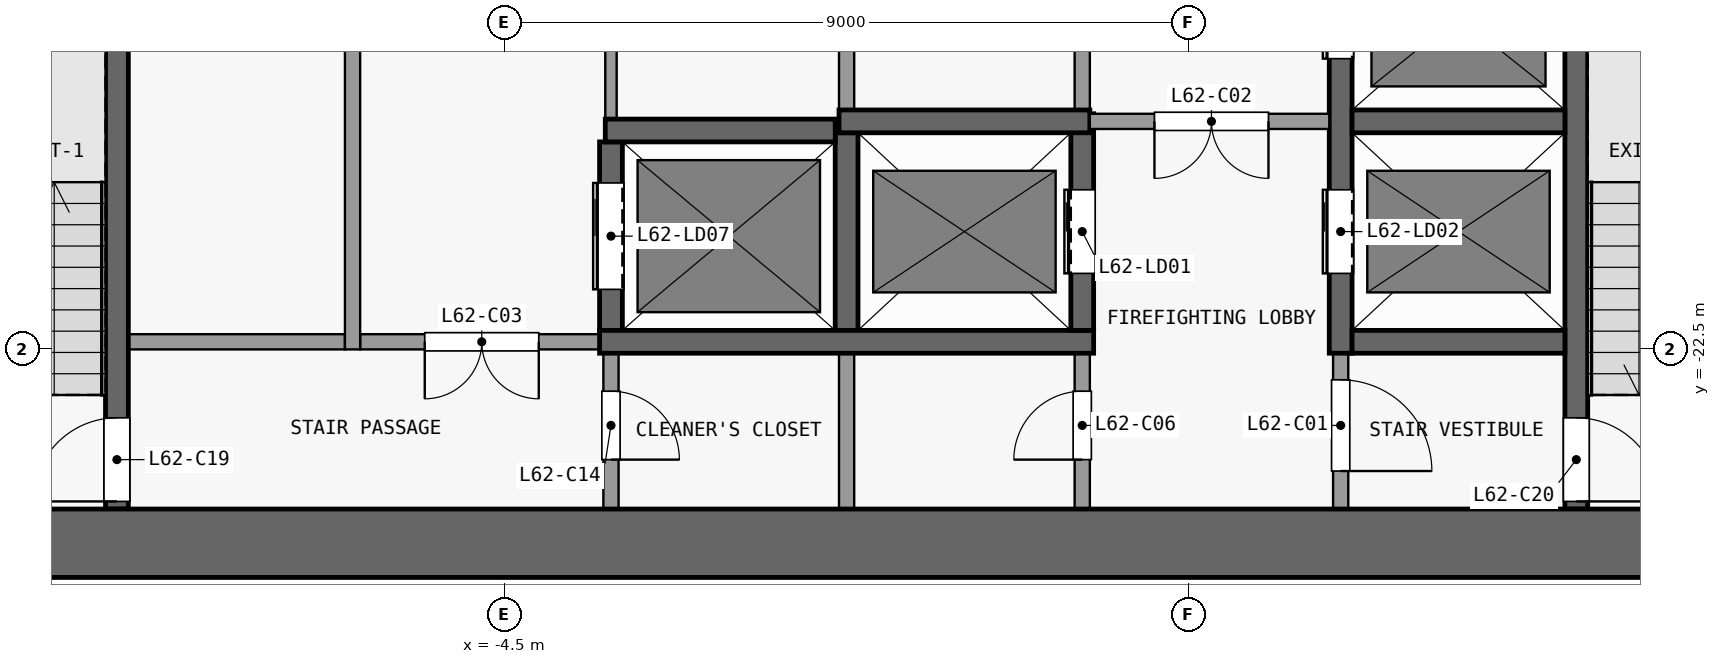
"""IFC4 building model, lengths in metres.
Left out: names, types, materials, properties, quantities, classifications, styles, units other than length and angle.
Written with IfcOpenShell. Run it as: python <this file> out.ifc"""

import sys

from ifc_helpers import new_model, si_unit, direction, frame, frame_2d, origin, place, context, subcontext, project, spatial, rectangle, extrude, element, fill, save


model = new_model("IFC4")
c1 = context("Model", 3, precision=1e-05, world=origin(), true_north=direction((0.0, 1.0)))
c2 = subcontext(c1, "Body", "Model", "MODEL_VIEW")
j1 = project(units=[si_unit("LENGTHUNIT", "METRE"), si_unit("PLANEANGLEUNIT", "RADIAN")], contexts=[c1])
p1 = place(None, origin())
s1 = spatial("IfcSite", under=j1, at=p1, CompositionType="ELEMENT")
p2 = place(p1, origin())
s2 = spatial("IfcBuilding", under=s1, at=p2, CompositionType="ELEMENT")
p3 = place(p2, frame((0.0, 0.0, 244.7)))
s3 = spatial("IfcBuildingStorey", under=s2, at=p3, CompositionType="ELEMENT", Elevation=244.7)
p4 = place(p3, frame((-13.2, -25.05, 0.0), z_axis=(0.0, 0.0, 1.0), x_axis=(1.0, 0.0, 0.0)))
e1 = element("IfcWall", 1, at=p4, inside=s3, PredefinedType="SHEAR", context=c2, shape_type="SweptSolid", body=[
    extrude(rectangle(XDim=26.4, YDim=0.9, at=frame_2d((13.2, 0.0))), origin(), (0.0, 0.0, 1.0), 3.15),
])
p5 = place(p3, frame((-9.45, -22.4, 0.0), z_axis=(0.0, 0.0, 1.0), x_axis=(1.0, 0.0, 0.0)))
e2 = element("IfcWall", 2, at=p5, inside=s3, PredefinedType="PARTITIONING", context=c2, shape_type="SweptSolid", body=[
    extrude(rectangle(XDim=2.85, YDim=0.2, at=frame_2d((1.425, 0.0))), origin(), (0.0, 0.0, 1.0), 3.15),
])
p6 = place(p3, frame((-3.25, -22.4, 0.0), z_axis=(0.0, 0.0, 1.0), x_axis=(-1.0, 0.0, 0.0)))
e3 = element("IfcWall", 3, at=p6, inside=s3, PredefinedType="PARTITIONING", context=c2, shape_type="SweptSolid", body=[
    extrude(rectangle(XDim=3.15, YDim=0.2, at=frame_2d((1.575, 0.0))), origin(), (0.0, 0.0, 1.0), 3.15),
])
p7 = place(p6, frame((0.8, 0.0, 0.0)))
e4 = element("IfcOpeningElement", 4, at=p7, cuts=e3, PredefinedType="OPENING", context=c2, shape_type="SweptSolid", body=[
    extrude(rectangle(XDim=1.5, YDim=2.1, at=frame_2d((0.75, 1.05))), frame((0.0, 0.11, 0.0), z_axis=(0.0, -1.0, 0.0), x_axis=(1.0, 0.0, 0.0)), (0.0, 0.0, 1.0), 0.22),
])
p8 = place(p3, frame((-3.25, -22.4, 0.0), z_axis=(0.0, 0.0, 1.0), x_axis=(1.0, 0.0, 0.0)))
e5 = element("IfcWall", 5, at=p8, inside=s3, PredefinedType="SHEAR", context=c2, shape_type="SweptSolid", body=[
    extrude(rectangle(XDim=6.5, YDim=0.3, at=frame_2d((3.25, 0.0))), origin(), (0.0, 0.0, 1.0), 3.15),
])
p9 = place(p3, frame((6.65, -22.4, 0.0), z_axis=(0.0, 0.0, 1.0), x_axis=(1.0, 0.0, 0.0)))
e6 = element("IfcWall", 6, at=p9, inside=s3, PredefinedType="SHEAR", context=c2, shape_type="SweptSolid", body=[
    extrude(rectangle(XDim=2.8, YDim=0.3, at=frame_2d((1.4, 0.0))), origin(), (0.0, 0.0, 1.0), 3.15),
])
p10 = place(p3, frame((-3.175, -19.62, 0.0), z_axis=(0.0, 0.0, 1.0), x_axis=(1.0, 0.0, 0.0)))
e7 = element("IfcWall", 7, at=p10, inside=s3, PredefinedType="SHEAR", context=c2, shape_type="SweptSolid", body=[
    extrude(rectangle(XDim=3.025, YDim=0.3, at=frame_2d((1.513, 0.0))), origin(), (0.0, 0.0, 1.0), 3.15),
])
p11 = place(p3, frame((-0.1, -19.5, 0.0), z_axis=(0.0, 0.0, 1.0), x_axis=(1.0, 0.0, 0.0)))
e8 = element("IfcWall", 8, at=p11, inside=s3, PredefinedType="SHEAR", context=c2, shape_type="SweptSolid", body=[
    extrude(rectangle(XDim=3.3, YDim=0.3, at=frame_2d((1.65, 0.0))), origin(), (0.0, 0.0, 1.0), 3.15),
])
p12 = place(p3, frame((6.35, -19.5, 0.0), z_axis=(0.0, 0.0, 1.0), x_axis=(-1.0, 0.0, 0.0)))
e9 = element("IfcWall", 9, at=p12, inside=s3, PredefinedType="PARTITIONING", context=c2, shape_type="SweptSolid", body=[
    extrude(rectangle(XDim=3.15, YDim=0.2, at=frame_2d((1.575, 0.0))), origin(), (0.0, 0.0, 1.0), 3.15),
])
p13 = place(p12, frame((0.8, 0.0, 0.0)))
e10 = element("IfcOpeningElement", 10, at=p13, cuts=e9, PredefinedType="OPENING", context=c2, shape_type="SweptSolid", body=[
    extrude(rectangle(XDim=1.5, YDim=2.1, at=frame_2d((0.75, 1.05))), frame((0.0, 0.11, 0.0), z_axis=(0.0, -1.0, 0.0), x_axis=(1.0, 0.0, 0.0)), (0.0, 0.0, 1.0), 0.22),
])
p14 = place(p3, frame((6.65, -19.5, 0.0), z_axis=(0.0, 0.0, 1.0), x_axis=(1.0, 0.0, 0.0)))
e11 = element("IfcWall", 11, at=p14, inside=s3, PredefinedType="SHEAR", context=c2, shape_type="SweptSolid", body=[
    extrude(rectangle(XDim=2.8, YDim=0.3, at=frame_2d((1.4, 0.0))), origin(), (0.0, 0.0, 1.0), 3.15),
])
p15 = place(p3, frame((-9.6, -24.6, 0.0), z_axis=(0.0, 0.0, 1.0), x_axis=(0.0, 1.0, 0.0)))
e12 = element("IfcWall", 12, at=p15, inside=s3, PredefinedType="SHEAR", context=c2, shape_type="SweptSolid", body=[
    extrude(rectangle(XDim=7.7, YDim=0.3, at=frame_2d((3.85, 0.0))), origin(), (0.0, 0.0, 1.0), 3.15),
])
p16 = place(p15, frame((0.1, 0.0, 0.0)))
e13 = element("IfcOpeningElement", 13, at=p16, cuts=e12, PredefinedType="OPENING", context=c2, shape_type="SweptSolid", body=[
    extrude(rectangle(XDim=1.1, YDim=2.1, at=frame_2d((0.55, 1.05))), frame((0.0, 0.16, 0.0), z_axis=(0.0, -1.0, 0.0), x_axis=(1.0, 0.0, 0.0)), (0.0, 0.0, 1.0), 0.32),
])
p17 = place(p3, frame((-6.5, -22.5, 0.0), z_axis=(0.0, 0.0, 1.0), x_axis=(0.0, 1.0, 0.0)))
e14 = element("IfcWall", 14, at=p17, inside=s3, PredefinedType="PARTITIONING", context=c2, shape_type="SweptSolid", body=[
    extrude(rectangle(XDim=14.0, YDim=0.2, at=frame_2d((7.0, 0.0))), origin(), (0.0, 0.0, 1.0), 3.15),
])
p18 = place(p17, frame((6.45, 0.0, 0.0)))
e15 = element("IfcOpeningElement", 15, at=p18, cuts=e14, PredefinedType="OPENING", context=c2, shape_type="SweptSolid", body=[
    extrude(rectangle(XDim=1.2, YDim=2.1, at=frame_2d((0.6, 1.05))), frame((0.0, 0.11, 0.0), z_axis=(0.0, -1.0, 0.0), x_axis=(1.0, 0.0, 0.0)), (0.0, 0.0, 1.0), 0.22),
])
p19 = place(p3, frame((-3.1, -22.55, 0.0), z_axis=(0.0, 0.0, 1.0), x_axis=(0.0, -1.0, 0.0)))
e16 = element("IfcWall", 16, at=p19, inside=s3, PredefinedType="PARTITIONING", context=c2, shape_type="SweptSolid", body=[
    extrude(rectangle(XDim=2.05, YDim=0.2, at=frame_2d((1.025, 0.0))), origin(), (0.0, 0.0, 1.0), 3.15),
])
p20 = place(p19, frame((0.5, 0.0, 0.0)))
e17 = element("IfcOpeningElement", 17, at=p20, cuts=e16, PredefinedType="OPENING", context=c2, shape_type="SweptSolid", body=[
    extrude(rectangle(XDim=0.9, YDim=2.1, at=frame_2d((0.45, 1.05))), frame((0.0, 0.11, 0.0), z_axis=(0.0, -1.0, 0.0), x_axis=(1.0, 0.0, 0.0)), (0.0, 0.0, 1.0), 0.22),
])
p21 = place(p3, frame((-3.1, -22.25, 0.0), z_axis=(0.0, 0.0, 1.0), x_axis=(0.0, 1.0, 0.0)))
e18 = element("IfcWall", 18, at=p21, inside=s3, PredefinedType="SHEAR", context=c2, shape_type="SweptSolid", body=[
    extrude(rectangle(XDim=2.48, YDim=0.3, at=frame_2d((1.24, 0.0))), origin(), (0.0, 0.0, 1.0), 3.15),
])
p22 = place(p21, frame((0.54, 0.0, 0.0)))
e19 = element("IfcOpeningElement", 19, at=p22, cuts=e18, PredefinedType="OPENING", context=c2, shape_type="SweptSolid", body=[
    extrude(rectangle(XDim=1.4, YDim=2.1, at=frame_2d((0.7, 1.05))), frame((0.0, 0.16, 0.0), z_axis=(0.0, -1.0, 0.0), x_axis=(1.0, 0.0, 0.0)), (0.0, 0.0, 1.0), 0.32),
])
p23 = place(p3, frame((-3.1, -8.5, 0.0), z_axis=(0.0, 0.0, 1.0), x_axis=(0.0, -1.0, 0.0)))
e20 = element("IfcWall", 20, at=p23, inside=s3, PredefinedType="PARTITIONING", context=c2, shape_type="SweptSolid", body=[
    extrude(rectangle(XDim=10.97, YDim=0.15, at=frame_2d((5.485, 0.0))), origin(), (0.0, 0.0, 1.0), 3.15),
])
p24 = place(p23, frame((7.74, 0.0, 0.0)))
e21 = element("IfcOpeningElement", 21, at=p24, cuts=e20, PredefinedType="OPENING", context=c2, shape_type="SweptSolid", body=[
    extrude(rectangle(XDim=1.2, YDim=2.1, at=frame_2d((0.6, 1.05))), frame((0.0, 0.085, 0.0), z_axis=(0.0, -1.0, 0.0), x_axis=(1.0, 0.0, 0.0)), (0.0, 0.0, 1.0), 0.17),
])
p25 = place(p23, frame((2.18, 0.0, 0.0)))
e22 = element("IfcOpeningElement", 22, at=p25, cuts=e20, PredefinedType="OPENING", context=c2, shape_type="SweptSolid", body=[
    extrude(rectangle(XDim=1.2, YDim=2.1, at=frame_2d((0.6, 1.05))), frame((0.0, 0.085, 0.0), z_axis=(0.0, -1.0, 0.0), x_axis=(1.0, 0.0, 0.0)), (0.0, 0.0, 1.0), 0.17),
])
p26 = place(p3, frame((0.0, -24.6, 0.0), z_axis=(0.0, 0.0, 1.0), x_axis=(0.0, 1.0, 0.0)))
e23 = element("IfcWall", 23, at=p26, inside=s3, PredefinedType="PARTITIONING", context=c2, shape_type="SweptSolid", body=[
    extrude(rectangle(XDim=2.05, YDim=0.2, at=frame_2d((1.025, 0.0))), origin(), (0.0, 0.0, 1.0), 3.15),
])
p27 = place(p3, frame((0.0, -22.25, 0.0), z_axis=(0.0, 0.0, 1.0), x_axis=(0.0, 1.0, 0.0)))
e24 = element("IfcWall", 24, at=p27, inside=s3, PredefinedType="SHEAR", context=c2, shape_type="SweptSolid", body=[
    extrude(rectangle(XDim=2.6, YDim=0.3, at=frame_2d((1.3, 0.0))), origin(), (0.0, 0.0, 1.0), 3.15),
])
p28 = place(p3, frame((0.0, -19.35, 0.0), z_axis=(0.0, 0.0, 1.0), x_axis=(0.0, 1.0, 0.0)))
e25 = element("IfcWall", 25, at=p28, inside=s3, PredefinedType="PARTITIONING", context=c2, shape_type="SweptSolid", body=[
    extrude(rectangle(XDim=10.85, YDim=0.2, at=frame_2d((5.425, 0.0))), origin(), (0.0, 0.0, 1.0), 3.15),
])
p29 = place(p3, frame((3.1, -24.6, 0.0), z_axis=(0.0, 0.0, 1.0), x_axis=(0.0, 1.0, 0.0)))
e26 = element("IfcWall", 26, at=p29, inside=s3, PredefinedType="PARTITIONING", context=c2, shape_type="SweptSolid", body=[
    extrude(rectangle(XDim=2.05, YDim=0.2, at=frame_2d((1.025, 0.0))), origin(), (0.0, 0.0, 1.0), 3.15),
])
p30 = place(p29, frame((0.65, 0.0, 0.0)))
e27 = element("IfcOpeningElement", 27, at=p30, cuts=e26, PredefinedType="OPENING", context=c2, shape_type="SweptSolid", body=[
    extrude(rectangle(XDim=0.9, YDim=2.1, at=frame_2d((0.45, 1.05))), frame((0.0, 0.11, 0.0), z_axis=(0.0, -1.0, 0.0), x_axis=(1.0, 0.0, 0.0)), (0.0, 0.0, 1.0), 0.22),
])
p31 = place(p3, frame((3.1, -22.25, 0.0), z_axis=(0.0, 0.0, 1.0), x_axis=(0.0, 1.0, 0.0)))
e28 = element("IfcWall", 28, at=p31, inside=s3, PredefinedType="SHEAR", context=c2, shape_type="SweptSolid", body=[
    extrude(rectangle(XDim=2.85, YDim=0.3, at=frame_2d((1.425, 0.0))), origin(), (0.0, 0.0, 1.0), 3.15),
])
p32 = place(p31, frame((0.75, 0.0, 0.0)))
e29 = element("IfcOpeningElement", 29, at=p32, cuts=e28, PredefinedType="OPENING", context=c2, shape_type="SweptSolid", body=[
    extrude(rectangle(XDim=1.1, YDim=2.1, at=frame_2d((0.55, 1.05))), frame((0.0, 0.16, 0.0), z_axis=(0.0, -1.0, 0.0), x_axis=(1.0, 0.0, 0.0)), (0.0, 0.0, 1.0), 0.32),
])
p33 = place(p3, frame((3.1, -19.6, 0.0), z_axis=(0.0, 0.0, 1.0), x_axis=(0.0, 1.0, 0.0)))
e30 = element("IfcWall", 30, at=p33, inside=s3, PredefinedType="PARTITIONING", context=c2, shape_type="SweptSolid", body=[
    extrude(rectangle(XDim=11.1, YDim=0.2, at=frame_2d((5.55, 0.0))), origin(), (0.0, 0.0, 1.0), 3.15),
])
p34 = place(p33, frame((2.25, 0.0, 0.0)))
e31 = element("IfcOpeningElement", 31, at=p34, cuts=e30, PredefinedType="OPENING", context=c2, shape_type="SweptSolid", body=[
    extrude(rectangle(XDim=1.2, YDim=2.1, at=frame_2d((0.6, 1.05))), frame((0.0, 0.11, 0.0), z_axis=(0.0, -1.0, 0.0), x_axis=(1.0, 0.0, 0.0)), (0.0, 0.0, 1.0), 0.22),
])
p35 = place(p33, frame((7.75, 0.0, 0.0)))
e32 = element("IfcOpeningElement", 32, at=p35, cuts=e30, PredefinedType="OPENING", context=c2, shape_type="SweptSolid", body=[
    extrude(rectangle(XDim=1.2, YDim=2.1, at=frame_2d((0.6, 1.05))), frame((0.0, 0.11, 0.0), z_axis=(0.0, -1.0, 0.0), x_axis=(1.0, 0.0, 0.0)), (0.0, 0.0, 1.0), 0.22),
])
p36 = place(p3, frame((6.5, -22.55, 0.0), z_axis=(0.0, 0.0, 1.0), x_axis=(0.0, -1.0, 0.0)))
e33 = element("IfcWall", 33, at=p36, inside=s3, PredefinedType="PARTITIONING", context=c2, shape_type="SweptSolid", body=[
    extrude(rectangle(XDim=2.05, YDim=0.2, at=frame_2d((1.025, 0.0))), origin(), (0.0, 0.0, 1.0), 3.15),
])
p37 = place(p36, frame((0.35, 0.0, 0.0)))
e34 = element("IfcOpeningElement", 34, at=p37, cuts=e33, PredefinedType="OPENING", context=c2, shape_type="SweptSolid", body=[
    extrude(rectangle(XDim=1.2, YDim=2.1, at=frame_2d((0.6, 1.05))), frame((0.0, 0.11, 0.0), z_axis=(0.0, -1.0, 0.0), x_axis=(1.0, 0.0, 0.0)), (0.0, 0.0, 1.0), 0.22),
])
p38 = place(p3, frame((6.5, -22.55, 0.0), z_axis=(0.0, 0.0, 1.0), x_axis=(0.0, 1.0, 0.0)))
e35 = element("IfcWall", 35, at=p38, inside=s3, PredefinedType="SHEAR", context=c2, shape_type="SweptSolid", body=[
    extrude(rectangle(XDim=14.05, YDim=0.3, at=frame_2d((7.025, 0.0))), origin(), (0.0, 0.0, 1.0), 3.15),
])
p39 = place(p38, frame((1.05, 0.0, 0.0)))
e36 = element("IfcOpeningElement", 36, at=p39, cuts=e35, PredefinedType="OPENING", context=c2, shape_type="SweptSolid", body=[
    extrude(rectangle(XDim=1.1, YDim=2.1, at=frame_2d((0.55, 1.05))), frame((0.0, 0.16, 0.0), z_axis=(0.0, -1.0, 0.0), x_axis=(1.0, 0.0, 0.0)), (0.0, 0.0, 1.0), 0.32),
])
p40 = place(p38, frame((3.875, 0.0, 0.0)))
e37 = element("IfcOpeningElement", 37, at=p40, cuts=e35, PredefinedType="OPENING", context=c2, shape_type="SweptSolid", body=[
    extrude(rectangle(XDim=1.1, YDim=2.1, at=frame_2d((0.55, 1.05))), frame((0.0, 0.16, 0.0), z_axis=(0.0, -1.0, 0.0), x_axis=(1.0, 0.0, 0.0)), (0.0, 0.0, 1.0), 0.32),
])
p41 = place(p38, frame((6.625, 0.0, 0.0)))
e38 = element("IfcOpeningElement", 38, at=p41, cuts=e35, PredefinedType="OPENING", context=c2, shape_type="SweptSolid", body=[
    extrude(rectangle(XDim=1.1, YDim=2.1, at=frame_2d((0.55, 1.05))), frame((0.0, 0.16, 0.0), z_axis=(0.0, -1.0, 0.0), x_axis=(1.0, 0.0, 0.0)), (0.0, 0.0, 1.0), 0.32),
])
p42 = place(p38, frame((9.375, 0.0, 0.0)))
e39 = element("IfcOpeningElement", 39, at=p42, cuts=e35, PredefinedType="OPENING", context=c2, shape_type="SweptSolid", body=[
    extrude(rectangle(XDim=1.1, YDim=2.1, at=frame_2d((0.55, 1.05))), frame((0.0, 0.16, 0.0), z_axis=(0.0, -1.0, 0.0), x_axis=(1.0, 0.0, 0.0)), (0.0, 0.0, 1.0), 0.32),
])
p43 = place(p38, frame((12.125, 0.0, 0.0)))
e40 = element("IfcOpeningElement", 40, at=p43, cuts=e35, PredefinedType="OPENING", context=c2, shape_type="SweptSolid", body=[
    extrude(rectangle(XDim=1.1, YDim=2.1, at=frame_2d((0.55, 1.05))), frame((0.0, 0.16, 0.0), z_axis=(0.0, -1.0, 0.0), x_axis=(1.0, 0.0, 0.0)), (0.0, 0.0, 1.0), 0.32),
])
p44 = place(p3, frame((9.6, -16.9, 0.0), z_axis=(0.0, 0.0, 1.0), x_axis=(0.0, -1.0, 0.0)))
e41 = element("IfcWall", 41, at=p44, inside=s3, PredefinedType="SHEAR", context=c2, shape_type="SweptSolid", body=[
    extrude(rectangle(XDim=7.7, YDim=0.3, at=frame_2d((3.85, 0.0))), origin(), (0.0, 0.0, 1.0), 3.15),
])
p45 = place(p44, frame((6.5, 0.0, 0.0)))
e42 = element("IfcOpeningElement", 42, at=p45, cuts=e41, PredefinedType="OPENING", context=c2, shape_type="SweptSolid", body=[
    extrude(rectangle(XDim=1.1, YDim=2.1, at=frame_2d((0.55, 1.05))), frame((0.0, 0.16, 0.0), z_axis=(0.0, -1.0, 0.0), x_axis=(1.0, 0.0, 0.0)), (0.0, 0.0, 1.0), 0.32),
])
p46 = place(p32, origin())
e43 = element("IfcDoor", 43, at=p46, inside=s3, OperationType="DOUBLE_DOOR_SLIDING", PredefinedType="DOOR", context=c2, shape_type="SweptSolid", body=[
    extrude(rectangle(XDim=1.1, YDim=2.1, at=frame_2d((0.55, 1.05))), frame((0.0, 0.025, 0.0), z_axis=(0.0, -1.0, 0.0), x_axis=(1.0, 0.0, 0.0)), (0.0, 0.0, 1.0), 0.05),
])
fill(e29, e43)
p47 = place(p39, origin())
e44 = element("IfcDoor", 44, at=p47, inside=s3, OperationType="DOUBLE_DOOR_SLIDING", PredefinedType="DOOR", context=c2, shape_type="SweptSolid", body=[
    extrude(rectangle(XDim=1.1, YDim=2.1, at=frame_2d((0.55, 1.05))), frame((0.0, 0.025, 0.0), z_axis=(0.0, -1.0, 0.0), x_axis=(1.0, 0.0, 0.0)), (0.0, 0.0, 1.0), 0.05),
])
fill(e36, e44)
p48 = place(p40, origin())
e45 = element("IfcDoor", 45, at=p48, inside=s3, OperationType="DOUBLE_DOOR_SLIDING", PredefinedType="DOOR", context=c2, shape_type="SweptSolid", body=[
    extrude(rectangle(XDim=1.1, YDim=2.1, at=frame_2d((0.55, 1.05))), frame((0.0, 0.025, 0.0), z_axis=(0.0, -1.0, 0.0), x_axis=(1.0, 0.0, 0.0)), (0.0, 0.0, 1.0), 0.05),
])
fill(e37, e45)
p49 = place(p22, origin())
e46 = element("IfcDoor", 46, at=p49, inside=s3, OperationType="DOUBLE_DOOR_SLIDING", PredefinedType="DOOR", context=c2, shape_type="SweptSolid", body=[
    extrude(rectangle(XDim=1.4, YDim=2.1, at=frame_2d((0.7, 1.05))), frame((0.0, 0.025, 0.0), z_axis=(0.0, -1.0, 0.0), x_axis=(1.0, 0.0, 0.0)), (0.0, 0.0, 1.0), 0.05),
])
fill(e19, e46)
p50 = place(p37, origin())
e47 = element("IfcDoor", 47, at=p50, inside=s3, OperationType="SINGLE_SWING_RIGHT", PredefinedType="DOOR", context=c2, shape_type="SweptSolid", body=[
    extrude(rectangle(XDim=1.2, YDim=2.1, at=frame_2d((0.6, 1.05))), frame((0.0, 0.025, 0.0), z_axis=(0.0, -1.0, 0.0), x_axis=(1.0, 0.0, 0.0)), (0.0, 0.0, 1.0), 0.05),
])
fill(e34, e47)
p51 = place(p13, origin())
e48 = element("IfcDoor", 48, at=p51, inside=s3, OperationType="DOUBLE_DOOR_SINGLE_SWING", PredefinedType="DOOR", context=c2, shape_type="SweptSolid", body=[
    extrude(rectangle(XDim=1.5, YDim=2.1, at=frame_2d((0.75, 1.05))), frame((0.0, 0.025, 0.0), z_axis=(0.0, -1.0, 0.0), x_axis=(1.0, 0.0, 0.0)), (0.0, 0.0, 1.0), 0.05),
])
fill(e10, e48)
p52 = place(p7, origin())
e49 = element("IfcDoor", 49, at=p52, inside=s3, OperationType="DOUBLE_DOOR_SINGLE_SWING", PredefinedType="DOOR", context=c2, shape_type="SweptSolid", body=[
    extrude(rectangle(XDim=1.5, YDim=2.1, at=frame_2d((0.75, 1.05))), frame((0.0, 0.025, 0.0), z_axis=(0.0, -1.0, 0.0), x_axis=(1.0, 0.0, 0.0)), (0.0, 0.0, 1.0), 0.05),
])
fill(e4, e49)
p53 = place(p30, origin())
e50 = element("IfcDoor", 50, at=p53, inside=s3, OperationType="SINGLE_SWING_LEFT", PredefinedType="DOOR", context=c2, shape_type="SweptSolid", body=[
    extrude(rectangle(XDim=0.9, YDim=2.1, at=frame_2d((0.45, 1.05))), frame((0.0, 0.025, 0.0), z_axis=(0.0, -1.0, 0.0), x_axis=(1.0, 0.0, 0.0)), (0.0, 0.0, 1.0), 0.05),
])
fill(e27, e50)
p54 = place(p20, origin())
e51 = element("IfcDoor", 51, at=p54, inside=s3, OperationType="SINGLE_SWING_RIGHT", PredefinedType="DOOR", context=c2, shape_type="SweptSolid", body=[
    extrude(rectangle(XDim=0.9, YDim=2.1, at=frame_2d((0.45, 1.05))), frame((0.0, 0.025, 0.0), z_axis=(0.0, -1.0, 0.0), x_axis=(1.0, 0.0, 0.0)), (0.0, 0.0, 1.0), 0.05),
])
fill(e17, e51)
p55 = place(p16, origin())
e52 = element("IfcDoor", 52, at=p55, inside=s3, OperationType="SINGLE_SWING_LEFT", PredefinedType="DOOR", context=c2, shape_type="SweptSolid", body=[
    extrude(rectangle(XDim=1.1, YDim=2.1, at=frame_2d((0.55, 1.05))), frame((0.0, 0.025, 0.0), z_axis=(0.0, -1.0, 0.0), x_axis=(1.0, 0.0, 0.0)), (0.0, 0.0, 1.0), 0.05),
])
fill(e13, e52)
p56 = place(p45, origin())
e53 = element("IfcDoor", 53, at=p56, inside=s3, OperationType="SINGLE_SWING_RIGHT", PredefinedType="DOOR", context=c2, shape_type="SweptSolid", body=[
    extrude(rectangle(XDim=1.1, YDim=2.1, at=frame_2d((0.55, 1.05))), frame((0.0, 0.025, 0.0), z_axis=(0.0, -1.0, 0.0), x_axis=(1.0, 0.0, 0.0)), (0.0, 0.0, 1.0), 0.05),
])
fill(e42, e53)
save(model, sys.argv[1])
